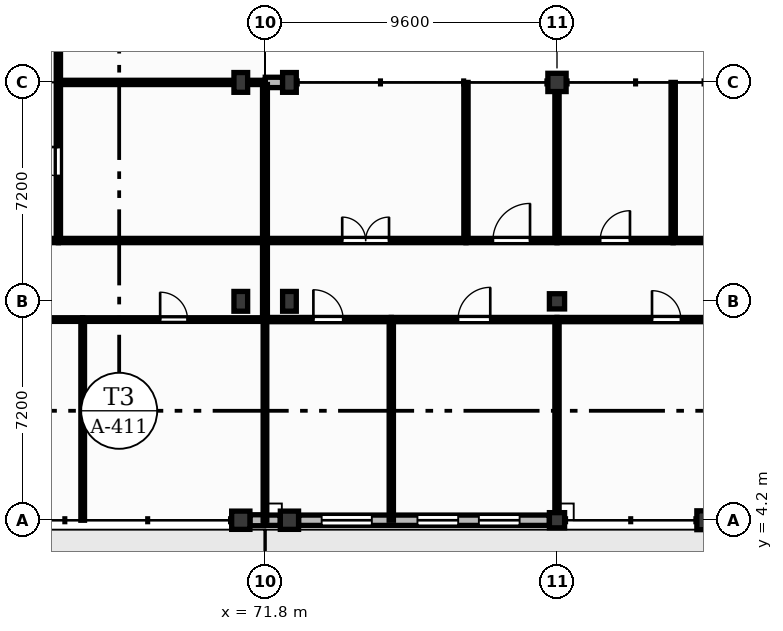
"""IFC4 building model, lengths in metres.
Left out: names, types, materials, properties, quantities, classifications, styles, units other than length and angle.
Written with IfcOpenShell. Run it as: python <this file> out.ifc"""

import sys

from ifc_helpers import new_model, si_unit, direction, frame, frame_2d, origin, origin_2d, place, context, subcontext, project, spatial, rectangle, extrude, element, fill, save


model = new_model("IFC4")
c1 = context("Model", 3, precision=1e-05, world=origin(), true_north=direction((0.0, 1.0)))
c2 = subcontext(c1, "Body", "Model", "MODEL_VIEW")
j1 = project(units=[si_unit("LENGTHUNIT", "METRE"), si_unit("PLANEANGLEUNIT", "RADIAN")], contexts=[c1])
p1 = place(None, origin())
s1 = spatial("IfcSite", under=j1, at=p1, CompositionType="ELEMENT")
p2 = place(p1, origin())
s2 = spatial("IfcBuilding", under=s1, at=p2, CompositionType="ELEMENT")
p3 = place(p2, origin())
s3 = spatial("IfcBuildingStorey", under=s2, at=p3, CompositionType="ELEMENT", Elevation=0.0)
p4 = place(p3, frame((72.6, 4.2, 0.0), z_axis=(0.0, 0.0, 1.0), x_axis=(1.0, 0.0, 0.0)))
e1 = element("IfcColumn", 1, at=p4, inside=s3, PredefinedType="COLUMN", context=c2, shape_type="SweptSolid", body=[
    extrude(rectangle(XDim=0.6, YDim=0.6, at=origin_2d()), origin(), (0.0, 0.0, 1.0), 4.2),
])
for number, where, z_axis, x_axis in (
    (2, (72.6, 11.4, 0.0), (0.0, 0.0, 1.0), (1.0, 0.0, 0.0)),
    (3, (72.6, 18.6, 0.0), (0.0, 0.0, 1.0), (1.0, 0.0, 0.0)),
):
    element("IfcColumn", number, at=place(p3, frame(where, z_axis=z_axis, x_axis=x_axis)), inside=s3, PredefinedType="COLUMN", context=c2, shape_type="SweptSolid", body=[
        extrude(rectangle(XDim=0.45, YDim=0.65, at=origin_2d()), origin(), (0.0, 0.0, 1.0), 4.2),
    ])
for number, where, z_axis, x_axis in (
    (4, (81.4, 4.2, 0.0), (0.0, 0.0, 1.0), (1.0, 0.0, 0.0)),
    (5, (81.4, 11.4, 0.0), (0.0, 0.0, 1.0), (1.0, 0.0, 0.0)),
):
    element("IfcColumn", number, at=place(p3, frame(where, z_axis=z_axis, x_axis=x_axis)), inside=s3, PredefinedType="COLUMN", context=c2, shape_type="SweptSolid", body=[
        extrude(rectangle(XDim=0.5, YDim=0.5, at=origin_2d()), origin(), (0.0, 0.0, 1.0), 4.2),
    ])
for number, where, z_axis, x_axis in (
    (6, (81.4, 18.6, 0.0), (0.0, 0.0, 1.0), (1.0, 0.0, 0.0)),
    (7, (71.0, 4.2, 0.0), (0.0, 0.0, 1.0), (1.0, 0.0, 0.0)),
):
    element("IfcColumn", number, at=place(p3, frame(where, z_axis=z_axis, x_axis=x_axis)), inside=s3, PredefinedType="COLUMN", context=c2, shape_type="SweptSolid", body=[
        extrude(rectangle(XDim=0.6, YDim=0.6, at=origin_2d()), origin(), (0.0, 0.0, 1.0), 4.2),
    ])
for number, where, z_axis, x_axis in (
    (8, (71.0, 11.4, 0.0), (0.0, 0.0, 1.0), (1.0, 0.0, 0.0)),
    (9, (71.0, 18.6, 0.0), (0.0, 0.0, 1.0), (1.0, 0.0, 0.0)),
):
    element("IfcColumn", number, at=place(p3, frame(where, z_axis=z_axis, x_axis=x_axis)), inside=s3, PredefinedType="COLUMN", context=c2, shape_type="SweptSolid", body=[
        extrude(rectangle(XDim=0.45, YDim=0.65, at=origin_2d()), origin(), (0.0, 0.0, 1.0), 4.2),
    ])
p5 = place(p3, frame((86.2, 4.2, 0.0), z_axis=(0.0, 0.0, 1.0), x_axis=(1.0, 0.0, 0.0)))
e10 = element("IfcColumn", 10, at=p5, inside=s3, PredefinedType="PILASTER", context=c2, shape_type="SweptSolid", body=[
    extrude(rectangle(XDim=0.4, YDim=0.62, at=origin_2d()), origin(), (0.0, 0.0, 1.0), 4.2),
])
p6 = place(p3, frame((71.3, 4.2, 0.0), z_axis=(0.0, 0.0, 1.0), x_axis=(1.0, 0.0, 0.0)))
e11 = element("IfcWall", 11, at=p6, inside=s3, PredefinedType="SOLIDWALL", context=c2, shape_type="SweptSolid", body=[
    extrude(rectangle(XDim=0.455, YDim=0.36, at=frame_2d((0.228, 0.0))), origin(), (0.0, 0.0, 1.0), 4.2),
])
p7 = place(p3, frame((71.805, 4.2, 0.0), z_axis=(0.0, 0.0, 1.0), x_axis=(1.0, 0.0, 0.0)))
e12 = element("IfcWall", 12, at=p7, inside=s3, PredefinedType="SOLIDWALL", context=c2, shape_type="SweptSolid", body=[
    extrude(rectangle(XDim=0.495, YDim=0.34, at=frame_2d((0.248, 0.0))), origin(), (0.0, 0.0, 1.0), 4.2),
])
p8 = place(p3, frame((72.9, 4.2, 0.0), z_axis=(0.0, 0.0, 1.0), x_axis=(1.0, 0.0, 0.0)))
e13 = element("IfcWall", 13, at=p8, inside=s3, PredefinedType="SOLIDWALL", context=c2, shape_type="SweptSolid", body=[
    extrude(rectangle(XDim=8.25, YDim=0.34, at=frame_2d((4.125, 0.0))), origin(), (0.0, 0.0, 1.0), 3.68),
])
p9 = place(p8, frame((0.76, 0.0, 1.35)))
e14 = element("IfcOpeningElement", 14, at=p9, cuts=e13, PredefinedType="OPENING", context=c2, shape_type="SweptSolid", body=[
    extrude(rectangle(XDim=1.65, YDim=1.4, at=frame_2d((0.825, 0.7))), frame((0.0, 0.18, 0.0), z_axis=(0.0, -1.0, 0.0), x_axis=(1.0, 0.0, 0.0)), (0.0, 0.0, 1.0), 0.36),
])
p10 = place(p8, frame((3.91, 0.0, 1.0)))
e15 = element("IfcOpeningElement", 15, at=p10, cuts=e13, PredefinedType="OPENING", context=c2, shape_type="SweptSolid", body=[
    extrude(rectangle(XDim=1.34, YDim=1.95, at=frame_2d((0.67, 0.975))), frame((0.0, 0.18, 0.0), z_axis=(0.0, -1.0, 0.0), x_axis=(1.0, 0.0, 0.0)), (0.0, 0.0, 1.0), 0.36),
])
p11 = place(p8, frame((5.93, 0.0, 1.0)))
e16 = element("IfcOpeningElement", 16, at=p11, cuts=e13, PredefinedType="OPENING", context=c2, shape_type="SweptSolid", body=[
    extrude(rectangle(XDim=1.34, YDim=1.95, at=frame_2d((0.67, 0.975))), frame((0.0, 0.18, 0.0), z_axis=(0.0, -1.0, 0.0), x_axis=(1.0, 0.0, 0.0)), (0.0, 0.0, 1.0), 0.36),
])
p12 = place(p3, frame((71.805, 18.6, 0.0), z_axis=(0.0, 0.0, 1.0), x_axis=(1.0, 0.0, 0.0)))
e17 = element("IfcWall", 17, at=p12, inside=s3, PredefinedType="SOLIDWALL", context=c2, shape_type="SweptSolid", body=[
    extrude(rectangle(XDim=0.57, YDim=0.34, at=frame_2d((0.285, 0.0))), origin(), (0.0, 0.0, 1.0), 4.2),
])
p13 = place(p3, frame((62.2, 10.8, 0.0), z_axis=(0.0, 0.0, 1.0), x_axis=(1.0, 0.0, 0.0)))
e18 = element("IfcWall", 18, at=p13, inside=s3, PredefinedType="PLUMBINGWALL", context=c2, shape_type="SweptSolid", body=[
    extrude(rectangle(XDim=3.6, YDim=0.12, at=frame_2d((1.8, 0.0))), origin(), (0.0, 0.0, 1.0), 4.18),
])
p14 = place(p13, frame((1.35, 0.0, 0.0)))
e19 = element("IfcOpeningElement", 19, at=p14, cuts=e18, PredefinedType="OPENING", context=c2, shape_type="SweptSolid", body=[
    extrude(rectangle(XDim=0.9, YDim=2.1, at=frame_2d((0.45, 1.05))), frame((0.0, 0.07, 0.0), z_axis=(0.0, -1.0, 0.0), x_axis=(1.0, 0.0, 0.0)), (0.0, 0.0, 1.0), 0.14),
])
p15 = place(p3, frame((62.2, 13.4, 0.0), z_axis=(0.0, 0.0, 1.0), x_axis=(1.0, 0.0, 0.0)))
e20 = element("IfcWall", 20, at=p15, inside=s3, PredefinedType="PARTITIONING", context=c2, shape_type="SweptSolid", body=[
    extrude(rectangle(XDim=2.8, YDim=0.14, at=frame_2d((1.4, 0.0))), origin(), (0.0, 0.0, 1.0), 4.18),
])
p16 = place(p15, frame((0.76, 0.0, 0.0)))
e21 = element("IfcOpeningElement", 21, at=p16, cuts=e20, PredefinedType="OPENING", context=c2, shape_type="SweptSolid", body=[
    extrude(rectangle(XDim=1.28, YDim=2.2, at=frame_2d((0.64, 1.1))), frame((0.0, 0.08, 0.0), z_axis=(0.0, -1.0, 0.0), x_axis=(1.0, 0.0, 0.0)), (0.0, 0.0, 1.0), 0.16),
])
p17 = place(p3, frame((65.0, 13.47, 0.0), z_axis=(0.0, 0.0, 1.0), x_axis=(0.0, 1.0, 0.0)))
e22 = element("IfcWall", 22, at=p17, inside=s3, PredefinedType="PARTITIONING", context=c2, shape_type="SweptSolid", body=[
    extrude(rectangle(XDim=5.06, YDim=0.14, at=frame_2d((2.53, 0.0))), origin(), (0.0, 0.0, 1.0), 4.18),
])
p18 = place(p17, frame((2.055, 0.0, 0.0)))
e23 = element("IfcOpeningElement", 23, at=p18, cuts=e22, PredefinedType="OPENING", context=c2, shape_type="SweptSolid", body=[
    extrude(rectangle(XDim=0.95, YDim=2.1, at=frame_2d((0.475, 1.05))), frame((0.0, 0.08, 0.0), z_axis=(0.0, -1.0, 0.0), x_axis=(1.0, 0.0, 0.0)), (0.0, 0.0, 1.0), 0.16),
])
p19 = place(p3, frame((65.0, 13.4, 0.0), z_axis=(0.0, 0.0, 1.0), x_axis=(1.0, 0.0, 0.0)))
e24 = element("IfcWall", 24, at=p19, inside=s3, PredefinedType="PARTITIONING", context=c2, shape_type="SweptSolid", body=[
    extrude(rectangle(XDim=6.795, YDim=0.14, at=frame_2d((3.397, 0.0))), origin(), (0.0, 0.0, 1.0), 4.18),
])
p20 = place(p3, frame((65.0, 18.67, 0.0), z_axis=(0.0, 0.0, 1.0), x_axis=(0.0, 1.0, 0.0)))
e25 = element("IfcWall", 25, at=p20, inside=s3, PredefinedType="PARTITIONING", context=c2, shape_type="SweptSolid", body=[
    extrude(rectangle(XDim=8.46, YDim=0.14, at=frame_2d((4.23, 0.0))), origin(), (0.0, 0.0, 1.0), 4.18),
])
p21 = place(p20, frame((3.33, 0.0, 0.0)))
e26 = element("IfcOpeningElement", 26, at=p21, cuts=e25, PredefinedType="OPENING", context=c2, shape_type="SweptSolid", body=[
    extrude(rectangle(XDim=1.8, YDim=2.3, at=frame_2d((0.9, 1.15))), frame((0.0, 0.08, 0.0), z_axis=(0.0, -1.0, 0.0), x_axis=(1.0, 0.0, 0.0)), (0.0, 0.0, 1.0), 0.16),
])
p22 = place(p3, frame((65.0, 18.6, 0.0), z_axis=(0.0, 0.0, 1.0), x_axis=(1.0, 0.0, 0.0)))
e27 = element("IfcWall", 27, at=p22, inside=s3, PredefinedType="PARTITIONING", context=c2, shape_type="SweptSolid", body=[
    extrude(rectangle(XDim=5.775, YDim=0.14, at=frame_2d((2.887, 0.0))), origin(), (0.0, 0.0, 1.0), 3.15),
])
p23 = place(p3, frame((71.225, 18.6, 0.0), z_axis=(0.0, 0.0, 1.0), x_axis=(1.0, 0.0, 0.0)))
e28 = element("IfcWall", 28, at=p23, inside=s3, PredefinedType="PARTITIONING", context=c2, shape_type="SweptSolid", body=[
    extrude(rectangle(XDim=0.57, YDim=0.14, at=frame_2d((0.285, 0.0))), origin(), (0.0, 0.0, 1.0), 4.18),
])
p24 = place(p3, frame((65.8, 4.2, 0.0), z_axis=(0.0, 0.0, 1.0), x_axis=(0.0, 1.0, 0.0)))
e29 = element("IfcWall", 29, at=p24, inside=s3, PredefinedType="PLUMBINGWALL", context=c2, shape_type="SweptSolid", body=[
    extrude(rectangle(XDim=6.53, YDim=0.12, at=frame_2d((3.265, 0.0))), origin(), (0.0, 0.0, 1.0), 4.18),
])
p25 = place(p3, frame((65.8, 10.8, 0.0), z_axis=(0.0, 0.0, 1.0), x_axis=(1.0, 0.0, 0.0)))
e30 = element("IfcWall", 30, at=p25, inside=s3, PredefinedType="PLUMBINGWALL", context=c2, shape_type="SweptSolid", body=[
    extrude(rectangle(XDim=5.995, YDim=0.12, at=frame_2d((2.998, 0.0))), origin(), (0.0, 0.0, 1.0), 4.18),
])
p26 = place(p25, frame((2.548, 0.0, 0.0)))
e31 = element("IfcOpeningElement", 31, at=p26, cuts=e30, PredefinedType="OPENING", context=c2, shape_type="SweptSolid", body=[
    extrude(rectangle(XDim=0.9, YDim=2.1, at=frame_2d((0.45, 1.05))), frame((0.0, 0.07, 0.0), z_axis=(0.0, -1.0, 0.0), x_axis=(1.0, 0.0, 0.0)), (0.0, 0.0, 1.0), 0.14),
])
p27 = place(p3, frame((71.805, 10.8, 0.0), z_axis=(0.0, 0.0, 1.0), x_axis=(1.0, 0.0, 0.0)))
e32 = element("IfcWall", 32, at=p27, inside=s3, PredefinedType="PARTITIONING", context=c2, shape_type="SweptSolid", body=[
    extrude(rectangle(XDim=4.145, YDim=0.14, at=frame_2d((2.073, 0.0))), origin(), (0.0, 0.0, 1.0), 4.18),
])
p28 = place(p27, frame((1.583, 0.0, 0.0)))
e33 = element("IfcOpeningElement", 33, at=p28, cuts=e32, PredefinedType="OPENING", context=c2, shape_type="SweptSolid", body=[
    extrude(rectangle(XDim=0.98, YDim=2.15, at=frame_2d((0.49, 1.075))), frame((0.0, 0.08, 0.0), z_axis=(0.0, -1.0, 0.0), x_axis=(1.0, 0.0, 0.0)), (0.0, 0.0, 1.0), 0.16),
])
p29 = place(p3, frame((71.805, 13.4, 0.0), z_axis=(0.0, 0.0, 1.0), x_axis=(1.0, 0.0, 0.0)))
e34 = element("IfcWall", 34, at=p29, inside=s3, PredefinedType="PARTITIONING", context=c2, shape_type="SweptSolid", body=[
    extrude(rectangle(XDim=6.601, YDim=0.14, at=frame_2d((3.301, 0.0))), origin(), (0.0, 0.0, 1.0), 4.18),
])
p30 = place(p29, frame((2.531, 0.0, 0.0)))
e35 = element("IfcOpeningElement", 35, at=p30, cuts=e34, PredefinedType="OPENING", context=c2, shape_type="SweptSolid", body=[
    extrude(rectangle(XDim=1.54, YDim=2.25, at=frame_2d((0.77, 1.125))), frame((0.0, 0.08, 0.0), z_axis=(0.0, -1.0, 0.0), x_axis=(1.0, 0.0, 0.0)), (0.0, 0.0, 1.0), 0.16),
])
p31 = place(p3, frame((75.95, 4.2, 0.0), z_axis=(0.0, 0.0, 1.0), x_axis=(0.0, 1.0, 0.0)))
e36 = element("IfcWall", 36, at=p31, inside=s3, PredefinedType="PARTITIONING", context=c2, shape_type="SweptSolid", body=[
    extrude(rectangle(XDim=6.53, YDim=0.14, at=frame_2d((3.265, 0.0))), origin(), (0.0, 0.0, 1.0), 4.18),
])
p32 = place(p3, frame((75.95, 10.8, 0.0), z_axis=(0.0, 0.0, 1.0), x_axis=(1.0, 0.0, 0.0)))
e37 = element("IfcWall", 37, at=p32, inside=s3, PredefinedType="PARTITIONING", context=c2, shape_type="SweptSolid", body=[
    extrude(rectangle(XDim=5.45, YDim=0.14, at=frame_2d((2.725, 0.0))), origin(), (0.0, 0.0, 1.0), 4.18),
])
p33 = place(p32, frame((2.195, 0.0, 0.0)))
e38 = element("IfcOpeningElement", 38, at=p33, cuts=e37, PredefinedType="OPENING", context=c2, shape_type="SweptSolid", body=[
    extrude(rectangle(XDim=1.06, YDim=2.15, at=frame_2d((0.53, 1.075))), frame((0.0, 0.08, 0.0), z_axis=(0.0, -1.0, 0.0), x_axis=(1.0, 0.0, 0.0)), (0.0, 0.0, 1.0), 0.16),
])
p34 = place(p3, frame((78.406, 13.47, 0.0), z_axis=(0.0, 0.0, 1.0), x_axis=(0.0, 1.0, 0.0)))
e39 = element("IfcWall", 39, at=p34, inside=s3, PredefinedType="PARTITIONING", context=c2, shape_type="SweptSolid", body=[
    extrude(rectangle(XDim=5.13, YDim=0.14, at=frame_2d((2.565, 0.0))), origin(), (0.0, 0.0, 1.0), 4.18),
])
p35 = place(p3, frame((78.406, 13.4, 0.0), z_axis=(0.0, 0.0, 1.0), x_axis=(1.0, 0.0, 0.0)))
e40 = element("IfcWall", 40, at=p35, inside=s3, PredefinedType="PARTITIONING", context=c2, shape_type="SweptSolid", body=[
    extrude(rectangle(XDim=2.994, YDim=0.14, at=frame_2d((1.497, 0.0))), origin(), (0.0, 0.0, 1.0), 4.18),
])
p36 = place(p35, frame((0.887, 0.0, 0.0)))
e41 = element("IfcOpeningElement", 41, at=p36, cuts=e40, PredefinedType="OPENING", context=c2, shape_type="SweptSolid", body=[
    extrude(rectangle(XDim=1.22, YDim=2.1, at=frame_2d((0.61, 1.05))), frame((0.0, 0.08, 0.0), z_axis=(0.0, -1.0, 0.0), x_axis=(1.0, 0.0, 0.0)), (0.0, 0.0, 1.0), 0.16),
])
p37 = place(p3, frame((81.4, 4.45, 0.0), z_axis=(0.0, 0.0, 1.0), x_axis=(0.0, 1.0, 0.0)))
e42 = element("IfcWall", 42, at=p37, inside=s3, PredefinedType="PARTITIONING", context=c2, shape_type="SweptSolid", body=[
    extrude(rectangle(XDim=6.28, YDim=0.14, at=frame_2d((3.14, 0.0))), origin(), (0.0, 0.0, 1.0), 3.5),
])
p38 = place(p3, frame((81.4, 10.8, 0.0), z_axis=(0.0, 0.0, 1.0), x_axis=(1.0, 0.0, 0.0)))
e43 = element("IfcWall", 43, at=p38, inside=s3, PredefinedType="PARTITIONING", context=c2, shape_type="SweptSolid", body=[
    extrude(rectangle(XDim=7.2, YDim=0.14, at=frame_2d((3.6, 0.0))), origin(), (0.0, 0.0, 1.0), 4.18),
])
p39 = place(p38, frame((3.125, 0.0, 0.0)))
e44 = element("IfcOpeningElement", 44, at=p39, cuts=e43, PredefinedType="OPENING", context=c2, shape_type="SweptSolid", body=[
    extrude(rectangle(XDim=0.95, YDim=2.1, at=frame_2d((0.475, 1.05))), frame((0.0, 0.08, 0.0), z_axis=(0.0, -1.0, 0.0), x_axis=(1.0, 0.0, 0.0)), (0.0, 0.0, 1.0), 0.16),
])
p40 = place(p3, frame((81.4, 13.47, 0.0), z_axis=(0.0, 0.0, 1.0), x_axis=(0.0, 1.0, 0.0)))
e45 = element("IfcWall", 45, at=p40, inside=s3, PredefinedType="PARTITIONING", context=c2, shape_type="SweptSolid", body=[
    extrude(rectangle(XDim=4.83, YDim=0.14, at=frame_2d((2.415, 0.0))), origin(), (0.0, 0.0, 1.0), 3.5),
])
p41 = place(p3, frame((81.4, 13.4, 0.0), z_axis=(0.0, 0.0, 1.0), x_axis=(1.0, 0.0, 0.0)))
e46 = element("IfcWall", 46, at=p41, inside=s3, PredefinedType="PARTITIONING", context=c2, shape_type="SweptSolid", body=[
    extrude(rectangle(XDim=3.821, YDim=0.14, at=frame_2d((1.911, 0.0))), origin(), (0.0, 0.0, 1.0), 4.18),
])
p42 = place(p41, frame((1.42, 0.0, 0.0)))
e47 = element("IfcOpeningElement", 47, at=p42, cuts=e46, PredefinedType="OPENING", context=c2, shape_type="SweptSolid", body=[
    extrude(rectangle(XDim=0.98, YDim=2.15, at=frame_2d((0.49, 1.075))), frame((0.0, 0.08, 0.0), z_axis=(0.0, -1.0, 0.0), x_axis=(1.0, 0.0, 0.0)), (0.0, 0.0, 1.0), 0.16),
])
p43 = place(p3, frame((85.221, 13.47, 0.0), z_axis=(0.0, 0.0, 1.0), x_axis=(0.0, 1.0, 0.0)))
e48 = element("IfcWall", 48, at=p43, inside=s3, PredefinedType="PARTITIONING", context=c2, shape_type="SweptSolid", body=[
    extrude(rectangle(XDim=5.13, YDim=0.14, at=frame_2d((2.565, 0.0))), origin(), (0.0, 0.0, 1.0), 4.18),
])
p44 = place(p3, frame((85.221, 13.4, 0.0), z_axis=(0.0, 0.0, 1.0), x_axis=(1.0, 0.0, 0.0)))
e49 = element("IfcWall", 49, at=p44, inside=s3, PredefinedType="PARTITIONING", context=c2, shape_type="SweptSolid", body=[
    extrude(rectangle(XDim=5.779, YDim=0.14, at=frame_2d((2.89, 0.0))), origin(), (0.0, 0.0, 1.0), 4.18),
])
p45 = place(p44, frame((2.36, 0.0, 0.0)))
e50 = element("IfcOpeningElement", 50, at=p45, cuts=e49, PredefinedType="OPENING", context=c2, shape_type="SweptSolid", body=[
    extrude(rectangle(XDim=1.06, YDim=2.15, at=frame_2d((0.53, 1.075))), frame((0.0, 0.08, 0.0), z_axis=(0.0, -1.0, 0.0), x_axis=(1.0, 0.0, 0.0)), (0.0, 0.0, 1.0), 0.16),
])
p46 = place(p3, frame((71.795, 10.87, 0.0), z_axis=(0.0, 0.0, 1.0), x_axis=(0.0, 1.0, 0.0)))
e51 = element("IfcWall", 51, at=p46, inside=s3, PredefinedType="PARTITIONING", context=c2, shape_type="SweptSolid", body=[
    extrude(rectangle(XDim=2.46, YDim=0.16, at=frame_2d((1.23, 0.0))), origin(), (0.0, 0.0, 1.0), 4.18),
])
p47 = place(p3, frame((71.795, 4.2, 0.0), z_axis=(0.0, 0.0, 1.0), x_axis=(0.0, 1.0, 0.0)))
e52 = element("IfcWall", 52, at=p47, inside=s3, PredefinedType="PLUMBINGWALL", context=c2, shape_type="SweptSolid", body=[
    extrude(rectangle(XDim=6.53, YDim=0.12, at=frame_2d((3.265, 0.0))), origin(), (0.0, 0.0, 1.0), 4.18),
])
p48 = place(p3, frame((71.795, 13.47, 0.0), z_axis=(0.0, 0.0, 1.0), x_axis=(0.0, 1.0, 0.0)))
e53 = element("IfcWall", 53, at=p48, inside=s3, PredefinedType="PARTITIONING", context=c2, shape_type="SweptSolid", body=[
    extrude(rectangle(XDim=5.06, YDim=0.16, at=frame_2d((2.53, 0.0))), origin(), (0.0, 0.0, 1.0), 4.18),
])
p49 = place(p9, origin())
e54 = element("IfcWindow", 54, at=p49, inside=s3, PartitioningType="DOUBLE_PANEL_VERTICAL", PredefinedType="WINDOW", context=c2, shape_type="SweptSolid", body=[
    extrude(rectangle(XDim=1.65, YDim=1.4, at=frame_2d((0.825, 0.7))), frame((0.0, 0.03, 0.0), z_axis=(0.0, -1.0, 0.0), x_axis=(1.0, 0.0, 0.0)), (0.0, 0.0, 1.0), 0.06),
])
fill(e14, e54)
p50 = place(p10, origin())
e55 = element("IfcWindow", 55, at=p50, inside=s3, PartitioningType="SINGLE_PANEL", PredefinedType="WINDOW", context=c2, shape_type="SweptSolid", body=[
    extrude(rectangle(XDim=1.34, YDim=1.95, at=frame_2d((0.67, 0.975))), frame((0.0, 0.03, 0.0), z_axis=(0.0, -1.0, 0.0), x_axis=(1.0, 0.0, 0.0)), (0.0, 0.0, 1.0), 0.06),
])
fill(e15, e55)
p51 = place(p11, origin())
e56 = element("IfcWindow", 56, at=p51, inside=s3, PartitioningType="SINGLE_PANEL", PredefinedType="WINDOW", context=c2, shape_type="SweptSolid", body=[
    extrude(rectangle(XDim=1.34, YDim=1.95, at=frame_2d((0.67, 0.975))), frame((0.0, 0.03, 0.0), z_axis=(0.0, -1.0, 0.0), x_axis=(1.0, 0.0, 0.0)), (0.0, 0.0, 1.0), 0.06),
])
fill(e16, e56)
p52 = place(p26, origin())
e57 = element("IfcDoor", 57, at=p52, inside=s3, OperationType="SINGLE_SWING_LEFT", PredefinedType="DOOR", context=c2, shape_type="SweptSolid", body=[
    extrude(rectangle(XDim=0.9, YDim=2.1, at=frame_2d((0.45, 1.05))), frame((0.0, 0.025, 0.0), z_axis=(0.0, -1.0, 0.0), x_axis=(1.0, 0.0, 0.0)), (0.0, 0.0, 1.0), 0.05),
])
fill(e31, e57)
p53 = place(p18, origin())
e58 = element("IfcDoor", 58, at=p53, inside=s3, OperationType="SINGLE_SWING_RIGHT", PredefinedType="DOOR", context=c2, shape_type="SweptSolid", body=[
    extrude(rectangle(XDim=0.95, YDim=2.1, at=frame_2d((0.475, 1.05))), frame((0.0, 0.025, 0.0), z_axis=(0.0, -1.0, 0.0), x_axis=(1.0, 0.0, 0.0)), (0.0, 0.0, 1.0), 0.05),
])
fill(e23, e58)
p54 = place(p28, origin())
e59 = element("IfcDoor", 59, at=p54, inside=s3, OperationType="SINGLE_SWING_LEFT", PredefinedType="DOOR", context=c2, shape_type="SweptSolid", body=[
    extrude(rectangle(XDim=0.98, YDim=2.15, at=frame_2d((0.49, 1.075))), frame((0.0, 0.025, 0.0), z_axis=(0.0, -1.0, 0.0), x_axis=(1.0, 0.0, 0.0)), (0.0, 0.0, 1.0), 0.05),
])
fill(e33, e59)
p55 = place(p33, origin())
e60 = element("IfcDoor", 60, at=p55, inside=s3, OperationType="SINGLE_SWING_RIGHT", PredefinedType="DOOR", context=c2, shape_type="SweptSolid", body=[
    extrude(rectangle(XDim=1.06, YDim=2.15, at=frame_2d((0.53, 1.075))), frame((0.0, 0.025, 0.0), z_axis=(0.0, -1.0, 0.0), x_axis=(1.0, 0.0, 0.0)), (0.0, 0.0, 1.0), 0.05),
])
fill(e38, e60)
p56 = place(p30, origin())
e61 = element("IfcDoor", 61, at=p56, inside=s3, OperationType="DOUBLE_DOOR_SINGLE_SWING", PredefinedType="DOOR", context=c2, shape_type="SweptSolid", body=[
    extrude(rectangle(XDim=1.54, YDim=2.25, at=frame_2d((0.77, 1.125))), frame((0.0, 0.025, 0.0), z_axis=(0.0, -1.0, 0.0), x_axis=(1.0, 0.0, 0.0)), (0.0, 0.0, 1.0), 0.05),
])
fill(e35, e61)
p57 = place(p36, origin())
e62 = element("IfcDoor", 62, at=p57, inside=s3, OperationType="SINGLE_SWING_RIGHT", PredefinedType="DOOR", context=c2, shape_type="SweptSolid", body=[
    extrude(rectangle(XDim=1.22, YDim=2.1, at=frame_2d((0.61, 1.05))), frame((0.0, 0.025, 0.0), z_axis=(0.0, -1.0, 0.0), x_axis=(1.0, 0.0, 0.0)), (0.0, 0.0, 1.0), 0.05),
])
fill(e41, e62)
p58 = place(p39, origin())
e63 = element("IfcDoor", 63, at=p58, inside=s3, OperationType="SINGLE_SWING_LEFT", PredefinedType="DOOR", context=c2, shape_type="SweptSolid", body=[
    extrude(rectangle(XDim=0.95, YDim=2.1, at=frame_2d((0.475, 1.05))), frame((0.0, 0.025, 0.0), z_axis=(0.0, -1.0, 0.0), x_axis=(1.0, 0.0, 0.0)), (0.0, 0.0, 1.0), 0.05),
])
fill(e44, e63)
p59 = place(p42, origin())
e64 = element("IfcDoor", 64, at=p59, inside=s3, OperationType="SINGLE_SWING_RIGHT", PredefinedType="DOOR", context=c2, shape_type="SweptSolid", body=[
    extrude(rectangle(XDim=0.98, YDim=2.15, at=frame_2d((0.49, 1.075))), frame((0.0, 0.025, 0.0), z_axis=(0.0, -1.0, 0.0), x_axis=(1.0, 0.0, 0.0)), (0.0, 0.0, 1.0), 0.05),
])
fill(e47, e64)
save(model, sys.argv[1])
